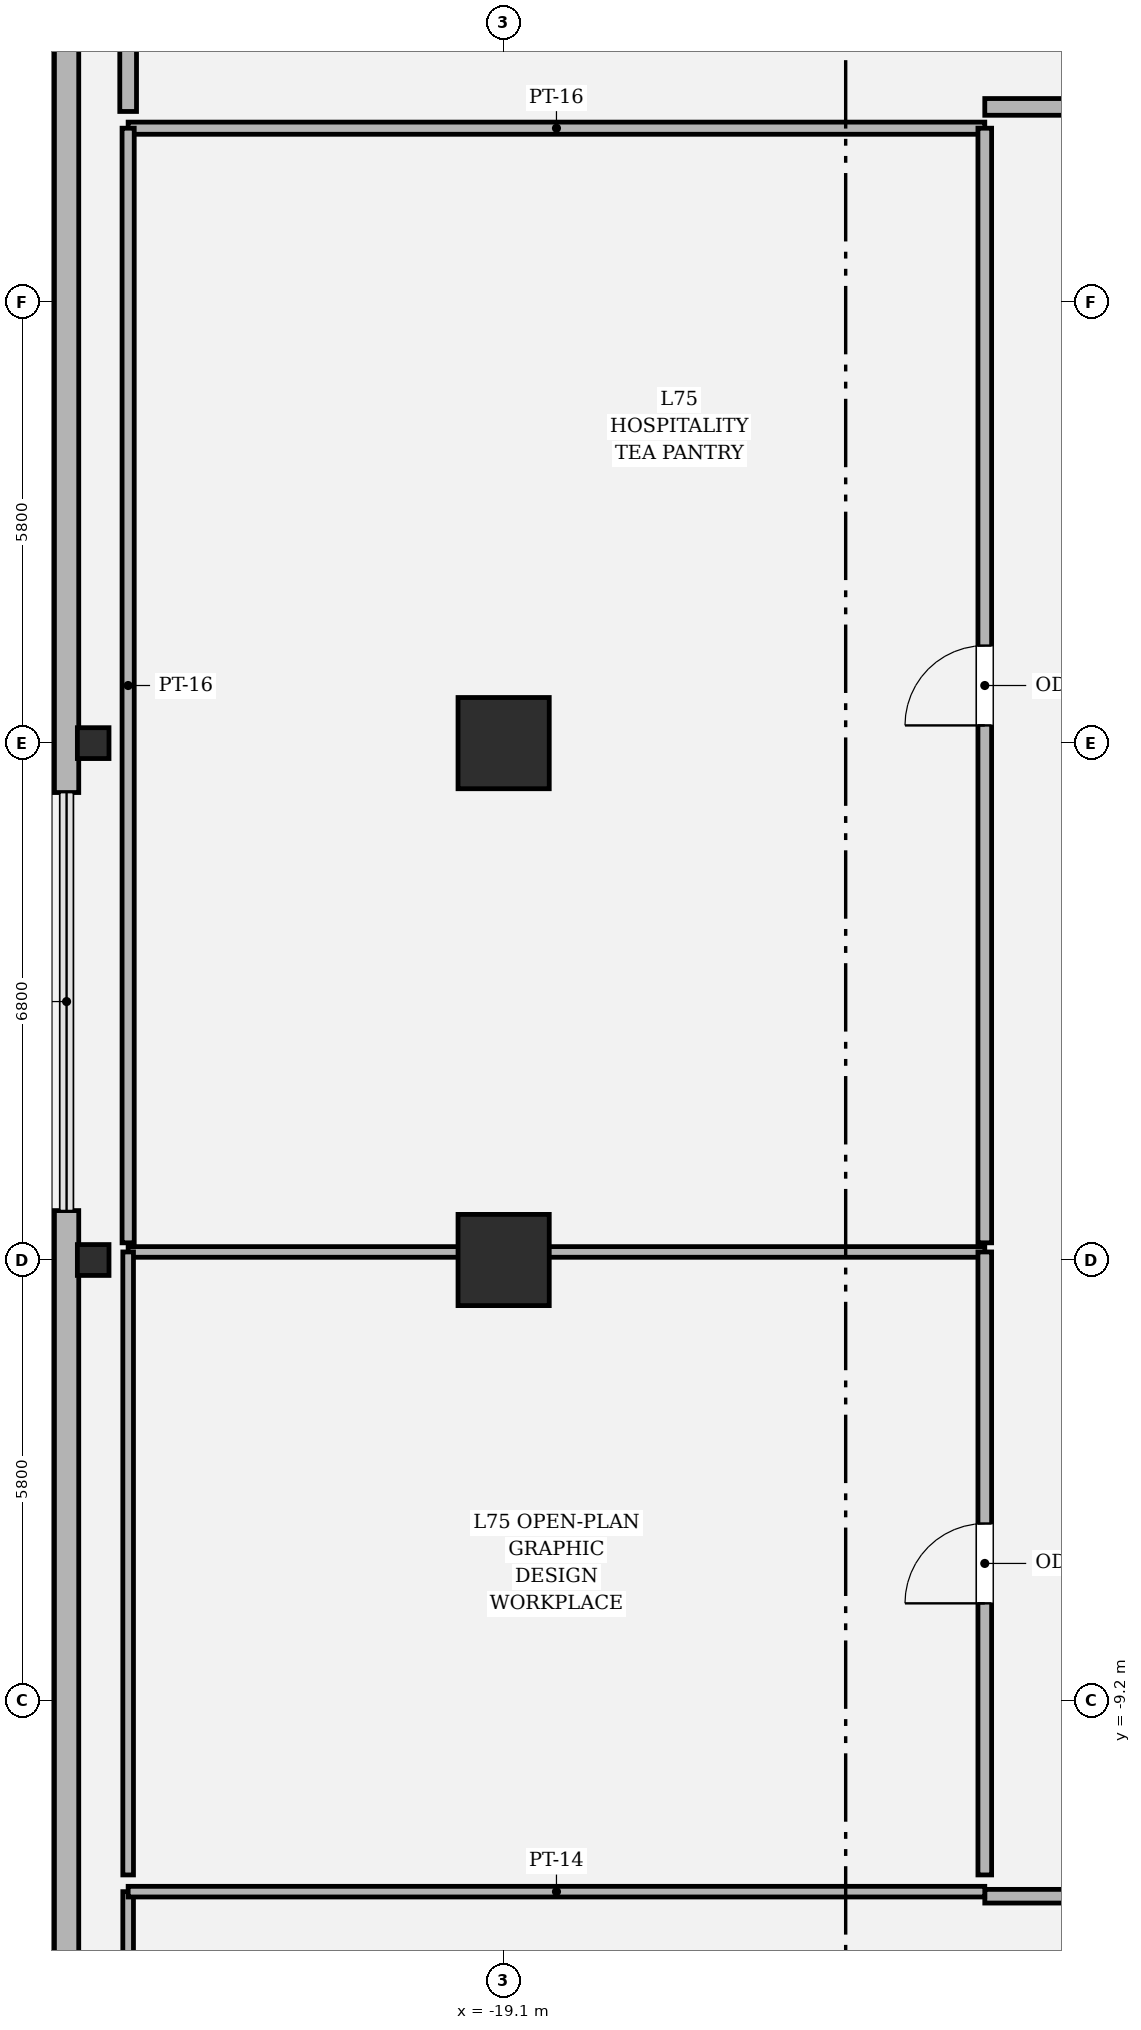
"""IFC4 building model, lengths in metres.
Left out: names, types, materials, properties, quantities, classifications, styles, units other than length and angle.
Written with IfcOpenShell. Run it as: python <this file> out.ifc"""

import sys

from ifc_helpers import new_model, si_unit, direction, frame, frame_2d, origin, origin_2d, place, context, subcontext, project, spatial, rectangle, hollow_rectangle, i_section, extrude, element, fill, save


model = new_model("IFC4")
c1 = context("Model", 3, precision=1e-05, world=origin(), true_north=direction((0.0, 1.0)))
c2 = subcontext(c1, "Body", "Model", "MODEL_VIEW")
j1 = project(units=[si_unit("LENGTHUNIT", "METRE"), si_unit("PLANEANGLEUNIT", "RADIAN")], contexts=[c1])
p1 = place(None, origin())
s1 = spatial("IfcSite", under=j1, at=p1, CompositionType="ELEMENT")
p2 = place(p1, origin())
s2 = spatial("IfcBuilding", under=s1, at=p2, CompositionType="ELEMENT")
p3 = place(p2, frame((0.0, 0.0, 317.4)))
s3 = spatial("IfcBuildingStorey", under=s2, at=p3, CompositionType="ELEMENT", Elevation=317.4)
for number, where, z_axis, x_axis in (
    (1, (-19.1, 3.4, 0.0), (0.0, 0.0, 1.0), (1.0, 0.0, 0.0)),
    (2, (-19.1, -3.4, 0.0), (0.0, 0.0, 1.0), (1.0, 0.0, 0.0)),
):
    element("IfcColumn", number, at=place(p3, frame(where, z_axis=z_axis, x_axis=x_axis)), inside=s3, PredefinedType="COLUMN", context=c2, shape_type="SweptSolid", body=[
        extrude(hollow_rectangle(XDim=1.2, YDim=1.2, WallThickness=0.035, at=origin_2d()), origin(), (0.0, 0.0, 1.0), 4.2),
    ])
for number, where, z_axis, x_axis in (
    (3, (-24.5, -3.4, 0.0), (0.0, 0.0, 1.0), (0.0, 1.0, 0.0)),
    (4, (-24.5, 3.4, 0.0), (0.0, 0.0, 1.0), (0.0, 1.0, 0.0)),
):
    element("IfcColumn", number, at=place(p3, frame(where, z_axis=z_axis, x_axis=x_axis)), inside=s3, PredefinedType="COLUMN", context=c2, shape_type="SweptSolid", body=[
        extrude(i_section(OverallWidth=0.406, OverallDepth=0.416, WebThickness=0.029, FlangeThickness=0.048, FilletRadius=0.018, at=origin_2d()), origin(), (0.0, 0.0, 1.0), 4.198),
    ])
p4 = place(p3, frame((-24.85, 15.437, 0.0), z_axis=(0.0, 0.0, 1.0), x_axis=(0.0, -1.0, 0.0)))
e5 = element("IfcWall", 5, at=p4, inside=s3, PredefinedType="SOLIDWALL", context=c2, shape_type="SweptSolid", body=[
    extrude(rectangle(XDim=12.687, YDim=0.32, at=frame_2d((6.344, 0.0))), origin(), (0.0, 0.0, 1.0), 2.714),
])
p5 = place(p3, frame((-24.85, -2.75, 0.0), z_axis=(0.0, 0.0, 1.0), x_axis=(0.0, -1.0, 0.0)))
e6 = element("IfcWall", 6, at=p5, inside=s3, PredefinedType="SOLIDWALL", context=c2, shape_type="SweptSolid", body=[
    extrude(rectangle(XDim=17.487, YDim=0.32, at=frame_2d((8.743, 0.0))), origin(), (0.0, 0.0, 1.0), 2.714),
])
p6 = place(p3, frame((-12.77, -11.77, 0.0), z_axis=(0.0, 0.0, 1.0), x_axis=(1.0, 0.0, 0.0)))
e7 = element("IfcWall", 7, at=p6, inside=s3, PredefinedType="PARTITIONING", context=c2, shape_type="SweptSolid", body=[
    extrude(rectangle(XDim=17.718, YDim=0.18, at=frame_2d((8.859, 0.0))), origin(), (0.0, 0.0, 1.0), 3.394),
])
p7 = place(p6, frame((8.334, 0.0, 0.0)))
e8 = element("IfcOpeningElement", 8, at=p7, cuts=e7, PredefinedType="OPENING", context=c2, shape_type="SweptSolid", body=[
    extrude(rectangle(XDim=1.05, YDim=2.2, at=frame_2d((0.525, 1.1))), frame((0.0, 0.1, 0.0), z_axis=(0.0, -1.0, 0.0), x_axis=(1.0, 0.0, 0.0)), (0.0, 0.0, 1.0), 0.2),
])
p8 = place(p3, frame((-24.04, -22.147, 0.0), z_axis=(0.0, 0.0, 1.0), x_axis=(0.0, 1.0, 0.0)))
e9 = element("IfcWall", 9, at=p8, inside=s3, PredefinedType="PARTITIONING", context=c2, shape_type="SweptSolid", body=[
    extrude(rectangle(XDim=10.438, YDim=0.14, at=frame_2d((5.219, 0.0))), origin(), (0.0, 0.0, 1.0), 2.674),
])
p9 = place(p3, frame((-24.04, -11.71, 0.0), z_axis=(0.0, 0.0, 1.0), x_axis=(1.0, 0.0, 0.0)))
e10 = element("IfcWall", 10, at=p9, inside=s3, PredefinedType="PARTITIONING", context=c2, shape_type="SweptSolid", body=[
    extrude(rectangle(XDim=11.27, YDim=0.14, at=frame_2d((5.635, 0.0))), origin(), (0.0, 0.0, 1.0), 3.394),
])
p10 = place(p3, frame((-24.04, -3.294, 0.0), z_axis=(0.0, 0.0, 1.0), x_axis=(1.0, 0.0, 0.0)))
e11 = element("IfcWall", 11, at=p10, inside=s3, PredefinedType="PARTITIONING", context=c2, shape_type="SweptSolid", body=[
    extrude(rectangle(XDim=11.27, YDim=0.14, at=frame_2d((5.635, 0.0))), origin(), (0.0, 0.0, 1.0), 2.674),
])
p11 = place(p3, frame((-12.77, -3.294, 0.0), z_axis=(0.0, 0.0, 1.0), x_axis=(0.0, -1.0, 0.0)))
e12 = element("IfcWall", 12, at=p11, inside=s3, PredefinedType="PARTITIONING", context=c2, shape_type="SweptSolid", body=[
    extrude(rectangle(XDim=8.196, YDim=0.18, at=frame_2d((4.098, 0.0))), origin(), (0.0, 0.0, 1.0), 3.394),
])
p12 = place(p11, frame((3.573, 0.0, 0.0)))
e13 = element("IfcOpeningElement", 13, at=p12, cuts=e12, PredefinedType="OPENING", context=c2, shape_type="SweptSolid", body=[
    extrude(rectangle(XDim=1.05, YDim=2.2, at=frame_2d((0.525, 1.1))), frame((0.0, 0.1, 0.0), z_axis=(0.0, -1.0, 0.0), x_axis=(1.0, 0.0, 0.0)), (0.0, 0.0, 1.0), 0.2),
])
p13 = place(p3, frame((-24.04, -11.49, 0.0), z_axis=(0.0, 0.0, 1.0), x_axis=(0.0, 1.0, 0.0)))
e14 = element("IfcWall", 14, at=p13, inside=s3, PredefinedType="PARTITIONING", context=c2, shape_type="SweptSolid", body=[
    extrude(rectangle(XDim=8.196, YDim=0.14, at=frame_2d((4.098, 0.0))), origin(), (0.0, 0.0, 1.0), 2.674),
])
p14 = place(p3, frame((-24.04, 11.49, 0.0), z_axis=(0.0, 0.0, 1.0), x_axis=(1.0, 0.0, 0.0)))
e15 = element("IfcWall", 15, at=p14, inside=s3, PredefinedType="PARTITIONING", context=c2, shape_type="SweptSolid", body=[
    extrude(rectangle(XDim=11.27, YDim=0.16, at=frame_2d((5.635, 0.0))), origin(), (0.0, 0.0, 1.0), 3.394),
])
p15 = place(p3, frame((-12.77, 11.49, 0.0), z_axis=(0.0, 0.0, 1.0), x_axis=(0.0, -1.0, 0.0)))
e16 = element("IfcWall", 16, at=p15, inside=s3, PredefinedType="PARTITIONING", context=c2, shape_type="SweptSolid", body=[
    extrude(rectangle(XDim=14.664, YDim=0.18, at=frame_2d((7.332, 0.0))), origin(), (0.0, 0.0, 1.0), 3.394),
])
p16 = place(p15, frame((6.807, 0.0, 0.0)))
e17 = element("IfcOpeningElement", 17, at=p16, cuts=e16, PredefinedType="OPENING", context=c2, shape_type="SweptSolid", body=[
    extrude(rectangle(XDim=1.05, YDim=2.2, at=frame_2d((0.525, 1.1))), frame((0.0, 0.1, 0.0), z_axis=(0.0, -1.0, 0.0), x_axis=(1.0, 0.0, 0.0)), (0.0, 0.0, 1.0), 0.2),
])
p17 = place(p3, frame((-24.04, -3.174, 0.0), z_axis=(0.0, 0.0, 1.0), x_axis=(0.0, 1.0, 0.0)))
e18 = element("IfcWall", 18, at=p17, inside=s3, PredefinedType="PARTITIONING", context=c2, shape_type="SweptSolid", body=[
    extrude(rectangle(XDim=14.664, YDim=0.16, at=frame_2d((7.332, 0.0))), origin(), (0.0, 0.0, 1.0), 2.674),
])
p18 = place(p3, frame((-1.27, 11.77, 0.0), z_axis=(0.0, 0.0, 1.0), x_axis=(-1.0, 0.0, 0.0)))
e19 = element("IfcWall", 19, at=p18, inside=s3, PredefinedType="SOLIDWALL", context=c2, shape_type="SweptSolid", body=[
    extrude(rectangle(XDim=11.5, YDim=0.22, at=frame_2d((5.75, 0.0))), origin(), (0.0, 0.0, 1.0), 3.394),
])
p19 = place(p3, frame((-24.04, 11.71, 0.0), z_axis=(0.0, 0.0, 1.0), x_axis=(0.0, 1.0, 0.0)))
e20 = element("IfcWall", 20, at=p19, inside=s3, PredefinedType="SOLIDWALL", context=c2, shape_type="SweptSolid", body=[
    extrude(rectangle(XDim=4.83, YDim=0.22, at=frame_2d((2.415, 0.0))), origin(), (0.0, 0.0, 1.0), 4.0),
])
p20 = place(p12, origin())
e21 = element("IfcDoor", 21, at=p20, inside=s3, OperationType="SINGLE_SWING_RIGHT", PredefinedType="DOOR", context=c2, shape_type="SweptSolid", body=[
    extrude(rectangle(XDim=1.05, YDim=2.2, at=frame_2d((0.525, 1.1))), frame((0.0, 0.025, 0.0), z_axis=(0.0, -1.0, 0.0), x_axis=(1.0, 0.0, 0.0)), (0.0, 0.0, 1.0), 0.05),
])
fill(e13, e21)
p21 = place(p16, origin())
e22 = element("IfcDoor", 22, at=p21, inside=s3, OperationType="SINGLE_SWING_RIGHT", PredefinedType="DOOR", context=c2, shape_type="SweptSolid", body=[
    extrude(rectangle(XDim=1.05, YDim=2.2, at=frame_2d((0.525, 1.1))), frame((0.0, 0.025, 0.0), z_axis=(0.0, -1.0, 0.0), x_axis=(1.0, 0.0, 0.0)), (0.0, 0.0, 1.0), 0.05),
])
fill(e17, e22)
save(model, sys.argv[1])
